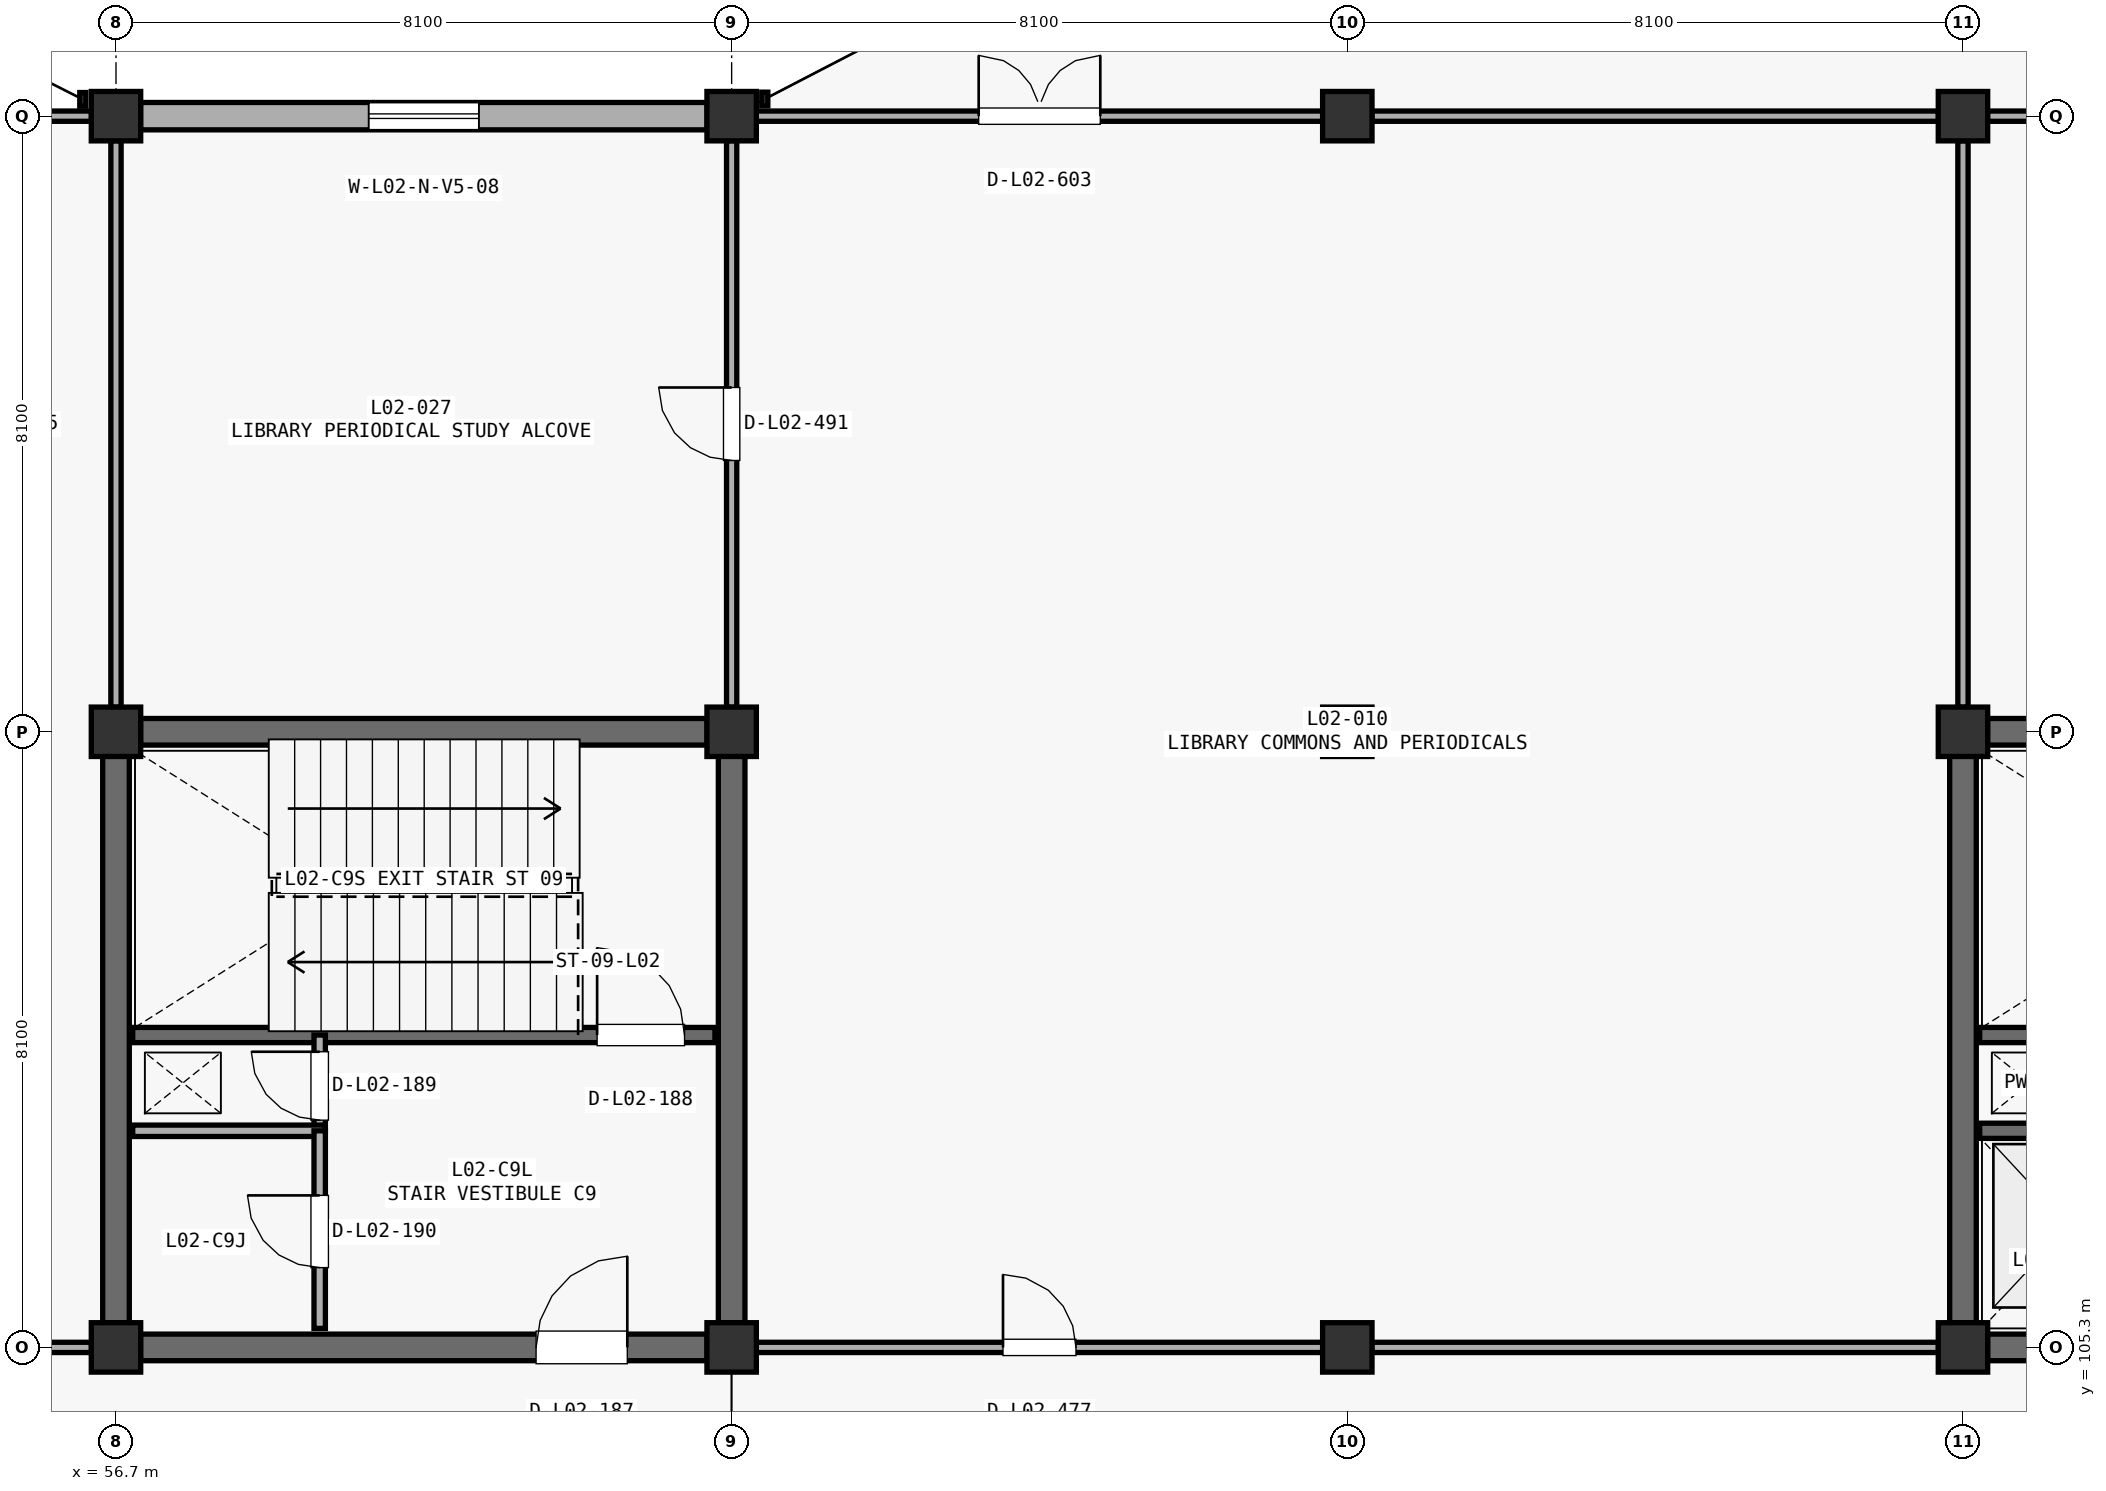
"""IFC4 building model, lengths in metres.
Left out: names, types, materials, properties, quantities, classifications, styles, units other than length and angle.
Written with IfcOpenShell. Run it as: python <this file> out.ifc"""

import sys

from ifc_helpers import new_model, si_unit, direction, frame, frame_2d, origin, origin_2d, place, context, subcontext, project, spatial, rectangle, extrude, element, fill, save


model = new_model("IFC4")
c1 = context("Model", 3, precision=1e-05, world=origin(), true_north=direction((0.0, 1.0)))
c2 = subcontext(c1, "Body", "Model", "MODEL_VIEW")
j1 = project(units=[si_unit("LENGTHUNIT", "METRE"), si_unit("PLANEANGLEUNIT", "RADIAN")], contexts=[c1])
p1 = place(None, origin())
s1 = spatial("IfcSite", under=j1, at=p1, CompositionType="ELEMENT")
p2 = place(p1, origin())
s2 = spatial("IfcBuilding", under=s1, at=p2, CompositionType="ELEMENT")
p3 = place(p2, frame((0.0, 0.0, 9.69)))
s3 = spatial("IfcBuildingStorey", under=s2, at=p3, CompositionType="ELEMENT", Elevation=9.69)
for number, where, z_axis, x_axis in (
    (1, (56.7, 105.3, 0.0), (0.0, 0.0, 1.0), (1.0, 0.0, 0.0)),
    (2, (56.7, 113.4, 0.0), (0.0, 0.0, 1.0), (1.0, 0.0, 0.0)),
    (3, (56.7, 121.5, 0.0), (0.0, 0.0, 1.0), (1.0, 0.0, 0.0)),
    (4, (64.8, 105.3, 0.0), (0.0, 0.0, 1.0), (1.0, 0.0, 0.0)),
    (5, (64.8, 113.4, 0.0), (0.0, 0.0, 1.0), (1.0, 0.0, 0.0)),
    (6, (64.8, 121.5, 0.0), (0.0, 0.0, 1.0), (1.0, 0.0, 0.0)),
    (7, (72.9, 105.3, 0.0), (0.0, 0.0, 1.0), (1.0, 0.0, 0.0)),
    (8, (72.9, 113.4, 0.0), (0.0, 0.0, 1.0), (1.0, 0.0, 0.0)),
    (9, (72.9, 121.5, 0.0), (0.0, 0.0, 1.0), (1.0, 0.0, 0.0)),
    (10, (81.0, 105.3, 0.0), (0.0, 0.0, 1.0), (1.0, 0.0, 0.0)),
    (11, (81.0, 113.4, 0.0), (0.0, 0.0, 1.0), (1.0, 0.0, 0.0)),
    (12, (81.0, 121.5, 0.0), (0.0, 0.0, 1.0), (1.0, 0.0, 0.0)),
):
    element("IfcColumn", number, at=place(p3, frame(where, z_axis=z_axis, x_axis=x_axis)), inside=s3, PredefinedType="COLUMN", context=c2, shape_type="SweptSolid", body=[
        extrude(rectangle(XDim=0.65, YDim=0.65, at=origin_2d()), origin(), (0.0, 0.0, 1.0), 4.42),
    ])
p4 = place(p3, frame((57.023, 121.5, 0.0), z_axis=(0.0, 0.0, 1.0), x_axis=(1.0, 0.0, 0.0)))
e13 = element("IfcWall", 13, at=p4, inside=s3, PredefinedType="STANDARD", context=c2, shape_type="SweptSolid", body=[
    extrude(rectangle(XDim=7.454, YDim=0.36, at=frame_2d((3.727, 0.0))), origin(), (0.0, 0.0, 1.0), 3.332),
])
p5 = place(p4, frame((3.002, 0.0, 0.85)))
e14 = element("IfcOpeningElement", 14, at=p5, cuts=e13, PredefinedType="OPENING", context=c2, shape_type="SweptSolid", body=[
    extrude(rectangle(XDim=1.45, YDim=1.7, at=frame_2d((0.725, 0.85))), frame((0.0, 0.19, 0.0), z_axis=(0.0, -1.0, 0.0), x_axis=(1.0, 0.0, 0.0)), (0.0, 0.0, 1.0), 0.38),
])
p6 = place(p3, frame((81.323, 113.4, 0.0), z_axis=(0.0, 0.0, 1.0), x_axis=(1.0, 0.0, 0.0)))
e15 = element("IfcWall", 15, at=p6, inside=s3, PredefinedType="SHEAR", context=c2, shape_type="SweptSolid", body=[
    extrude(rectangle(XDim=7.454, YDim=0.35, at=frame_2d((3.727, 0.0))), origin(), (0.0, 0.0, 1.0), 4.142),
])
p7 = place(p3, frame((81.0, 105.623, 0.0), z_axis=(0.0, 0.0, 1.0), x_axis=(0.0, 1.0, 0.0)))
e16 = element("IfcWall", 16, at=p7, inside=s3, PredefinedType="SHEAR", context=c2, shape_type="SweptSolid", body=[
    extrude(rectangle(XDim=7.454, YDim=0.35, at=frame_2d((3.727, 0.0))), origin(), (0.0, 0.0, 1.0), 4.142),
])
p8 = place(p3, frame((81.323, 105.3, 0.0), z_axis=(0.0, 0.0, 1.0), x_axis=(1.0, 0.0, 0.0)))
e17 = element("IfcWall", 17, at=p8, inside=s3, PredefinedType="SHEAR", context=c2, shape_type="SweptSolid", body=[
    extrude(rectangle(XDim=7.454, YDim=0.35, at=frame_2d((3.727, 0.0))), origin(), (0.0, 0.0, 1.0), 4.142),
])
p9 = place(p8, frame((5.204, 0.0, 0.0)))
e18 = element("IfcOpeningElement", 18, at=p9, cuts=e17, PredefinedType="OPENING", context=c2, shape_type="SweptSolid", body=[
    extrude(rectangle(XDim=1.2, YDim=2.2, at=frame_2d((0.6, 1.1))), frame((0.0, 0.185, 0.0), z_axis=(0.0, -1.0, 0.0), x_axis=(1.0, 0.0, 0.0)), (0.0, 0.0, 1.0), 0.37),
])
p10 = place(p3, frame((81.22, 109.41, 0.0), z_axis=(0.0, 0.0, 1.0), x_axis=(1.0, 0.0, 0.0)))
e19 = element("IfcWall", 19, at=p10, inside=s3, PredefinedType="SHEAR", context=c2, shape_type="SweptSolid", body=[
    extrude(rectangle(XDim=7.66, YDim=0.2, at=frame_2d((3.83, 0.0))), origin(), (0.0, 0.0, 1.0), 4.142),
])
p11 = place(p10, frame((6.11, 0.0, 0.0)))
e20 = element("IfcOpeningElement", 20, at=p11, cuts=e19, PredefinedType="OPENING", context=c2, shape_type="SweptSolid", body=[
    extrude(rectangle(XDim=1.15, YDim=2.2, at=frame_2d((0.575, 1.1))), frame((0.0, 0.11, 0.0), z_axis=(0.0, -1.0, 0.0), x_axis=(1.0, 0.0, 0.0)), (0.0, 0.0, 1.0), 0.22),
])
p12 = place(p3, frame((81.22, 108.15, 0.0), z_axis=(0.0, 0.0, 1.0), x_axis=(1.0, 0.0, 0.0)))
e21 = element("IfcWall", 21, at=p12, inside=s3, PredefinedType="SHEAR", context=c2, shape_type="SweptSolid", body=[
    extrude(rectangle(XDim=2.56, YDim=0.2, at=frame_2d((1.28, 0.0))), origin(), (0.0, 0.0, 1.0), 4.142),
])
p13 = place(p3, frame((57.023, 113.4, 0.0), z_axis=(0.0, 0.0, 1.0), x_axis=(1.0, 0.0, 0.0)))
e22 = element("IfcWall", 22, at=p13, inside=s3, PredefinedType="SHEAR", context=c2, shape_type="SweptSolid", body=[
    extrude(rectangle(XDim=7.454, YDim=0.35, at=frame_2d((3.727, 0.0))), origin(), (0.0, 0.0, 1.0), 4.082),
])
for number, where, z_axis, x_axis in (
    (23, (56.7, 105.623, 0.0), (0.0, 0.0, 1.0), (0.0, 1.0, 0.0)),
    (24, (64.8, 105.623, 0.0), (0.0, 0.0, 1.0), (0.0, 1.0, 0.0)),
):
    element("IfcWall", number, at=place(p3, frame(where, z_axis=z_axis, x_axis=x_axis)), inside=s3, PredefinedType="SHEAR", context=c2, shape_type="SweptSolid", body=[
        extrude(rectangle(XDim=7.454, YDim=0.35, at=frame_2d((3.727, 0.0))), origin(), (0.0, 0.0, 1.0), 4.082),
    ])
p14 = place(p3, frame((57.023, 105.3, 0.0), z_axis=(0.0, 0.0, 1.0), x_axis=(1.0, 0.0, 0.0)))
e25 = element("IfcWall", 25, at=p14, inside=s3, PredefinedType="SHEAR", context=c2, shape_type="SweptSolid", body=[
    extrude(rectangle(XDim=7.454, YDim=0.35, at=frame_2d((3.727, 0.0))), origin(), (0.0, 0.0, 1.0), 4.082),
])
p15 = place(p14, frame((5.204, 0.0, 0.0)))
e26 = element("IfcOpeningElement", 26, at=p15, cuts=e25, PredefinedType="OPENING", context=c2, shape_type="SweptSolid", body=[
    extrude(rectangle(XDim=1.2, YDim=2.2, at=frame_2d((0.6, 1.1))), frame((0.0, 0.185, 0.0), z_axis=(0.0, -1.0, 0.0), x_axis=(1.0, 0.0, 0.0)), (0.0, 0.0, 1.0), 0.37),
])
p16 = place(p3, frame((56.92, 109.41, 0.0), z_axis=(0.0, 0.0, 1.0), x_axis=(1.0, 0.0, 0.0)))
e27 = element("IfcWall", 27, at=p16, inside=s3, PredefinedType="SHEAR", context=c2, shape_type="SweptSolid", body=[
    extrude(rectangle(XDim=7.66, YDim=0.2, at=frame_2d((3.83, 0.0))), origin(), (0.0, 0.0, 1.0), 4.082),
])
p17 = place(p16, frame((6.11, 0.0, 0.0)))
e28 = element("IfcOpeningElement", 28, at=p17, cuts=e27, PredefinedType="OPENING", context=c2, shape_type="SweptSolid", body=[
    extrude(rectangle(XDim=1.15, YDim=2.2, at=frame_2d((0.575, 1.1))), frame((0.0, 0.11, 0.0), z_axis=(0.0, -1.0, 0.0), x_axis=(1.0, 0.0, 0.0)), (0.0, 0.0, 1.0), 0.22),
])
p18 = place(p3, frame((59.38, 108.15, 0.0), z_axis=(0.0, 0.0, 1.0), x_axis=(0.0, 1.0, 0.0)))
e29 = element("IfcWall", 29, at=p18, inside=s3, PredefinedType="PARTITIONING", context=c2, shape_type="SweptSolid", body=[
    extrude(rectangle(XDim=1.26, YDim=0.15, at=frame_2d((0.63, 0.0))), origin(), (0.0, 0.0, 1.0), 4.082),
])
p19 = place(p18, frame((0.14, 0.0, 0.0)))
e30 = element("IfcOpeningElement", 30, at=p19, cuts=e29, PredefinedType="OPENING", context=c2, shape_type="SweptSolid", body=[
    extrude(rectangle(XDim=0.9, YDim=2.15, at=frame_2d((0.45, 1.075))), frame((0.0, 0.085, 0.0), z_axis=(0.0, -1.0, 0.0), x_axis=(1.0, 0.0, 0.0)), (0.0, 0.0, 1.0), 0.17),
])
p20 = place(p3, frame((56.92, 108.15, 0.0), z_axis=(0.0, 0.0, 1.0), x_axis=(1.0, 0.0, 0.0)))
e31 = element("IfcWall", 31, at=p20, inside=s3, PredefinedType="PARTITIONING", context=c2, shape_type="SweptSolid", body=[
    extrude(rectangle(XDim=2.53, YDim=0.15, at=frame_2d((1.265, 0.0))), origin(), (0.0, 0.0, 1.0), 4.082),
])
p21 = place(p3, frame((59.38, 105.55, 0.0), z_axis=(0.0, 0.0, 1.0), x_axis=(0.0, 1.0, 0.0)))
e32 = element("IfcWall", 32, at=p21, inside=s3, PredefinedType="PARTITIONING", context=c2, shape_type="SweptSolid", body=[
    extrude(rectangle(XDim=2.6, YDim=0.15, at=frame_2d((1.3, 0.0))), origin(), (0.0, 0.0, 1.0), 4.082),
])
p22 = place(p21, frame((0.8, 0.0, 0.0)))
e33 = element("IfcOpeningElement", 33, at=p22, cuts=e32, PredefinedType="OPENING", context=c2, shape_type="SweptSolid", body=[
    extrude(rectangle(XDim=0.95, YDim=2.15, at=frame_2d((0.475, 1.075))), frame((0.0, 0.085, 0.0), z_axis=(0.0, -1.0, 0.0), x_axis=(1.0, 0.0, 0.0)), (0.0, 0.0, 1.0), 0.17),
])
p23 = place(p3, frame((48.923, 105.3, 0.0), z_axis=(0.0, 0.0, 1.0), x_axis=(1.0, 0.0, 0.0)))
e34 = element("IfcWall", 34, at=p23, inside=s3, PredefinedType="PARTITIONING", context=c2, shape_type="SweptSolid", body=[
    extrude(rectangle(XDim=7.454, YDim=0.135, at=frame_2d((3.727, 0.0))), origin(), (0.0, 0.0, 1.0), 3.482),
])
p24 = place(p23, frame((3.247, 0.0, 0.0)))
e35 = element("IfcOpeningElement", 35, at=p24, cuts=e34, PredefinedType="OPENING", context=c2, shape_type="SweptSolid", body=[
    extrude(rectangle(XDim=0.96, YDim=2.15, at=frame_2d((0.48, 1.075))), frame((0.0, 0.078, 0.0), z_axis=(0.0, -1.0, 0.0), x_axis=(1.0, 0.0, 0.0)), (0.0, 0.0, 1.0), 0.155),
])
p25 = place(p3, frame((56.7, 113.723, 0.0), z_axis=(0.0, 0.0, 1.0), x_axis=(0.0, 1.0, 0.0)))
e36 = element("IfcWall", 36, at=p25, inside=s3, PredefinedType="PARTITIONING", context=c2, shape_type="SweptSolid", body=[
    extrude(rectangle(XDim=7.454, YDim=0.135, at=frame_2d((3.727, 0.0))), origin(), (0.0, 0.0, 1.0), 3.432),
])
p26 = place(p3, frame((48.923, 121.5, 0.0), z_axis=(0.0, 0.0, 1.0), x_axis=(1.0, 0.0, 0.0)))
e37 = element("IfcWall", 37, at=p26, inside=s3, PredefinedType="PARTITIONING", context=c2, shape_type="SweptSolid", body=[
    extrude(rectangle(XDim=7.454, YDim=0.135, at=frame_2d((3.727, 0.0))), origin(), (0.0, 0.0, 1.0), 3.667),
])
p27 = place(p3, frame((65.123, 105.3, 0.0), z_axis=(0.0, 0.0, 1.0), x_axis=(1.0, 0.0, 0.0)))
e38 = element("IfcWall", 38, at=p27, inside=s3, PredefinedType="PARTITIONING", context=c2, shape_type="SweptSolid", body=[
    extrude(rectangle(XDim=7.454, YDim=0.135, at=frame_2d((3.727, 0.0))), origin(), (0.0, 0.0, 1.0), 3.192),
])
p28 = place(p27, frame((3.247, 0.0, 0.0)))
e39 = element("IfcOpeningElement", 39, at=p28, cuts=e38, PredefinedType="OPENING", context=c2, shape_type="SweptSolid", body=[
    extrude(rectangle(XDim=0.96, YDim=2.15, at=frame_2d((0.48, 1.075))), frame((0.0, 0.078, 0.0), z_axis=(0.0, -1.0, 0.0), x_axis=(1.0, 0.0, 0.0)), (0.0, 0.0, 1.0), 0.155),
])
p29 = place(p3, frame((73.223, 105.3, 0.0), z_axis=(0.0, 0.0, 1.0), x_axis=(1.0, 0.0, 0.0)))
e40 = element("IfcWall", 40, at=p29, inside=s3, PredefinedType="PARTITIONING", context=c2, shape_type="SweptSolid", body=[
    extrude(rectangle(XDim=7.454, YDim=0.135, at=frame_2d((3.727, 0.0))), origin(), (0.0, 0.0, 1.0), 3.392),
])
p30 = place(p3, frame((81.0, 113.723, 0.0), z_axis=(0.0, 0.0, 1.0), x_axis=(0.0, 1.0, 0.0)))
e41 = element("IfcWall", 41, at=p30, inside=s3, PredefinedType="PARTITIONING", context=c2, shape_type="SweptSolid", body=[
    extrude(rectangle(XDim=7.454, YDim=0.135, at=frame_2d((3.727, 0.0))), origin(), (0.0, 0.0, 1.0), 3.542),
])
p31 = place(p3, frame((64.8, 113.723, 0.0), z_axis=(0.0, 0.0, 1.0), x_axis=(0.0, 1.0, 0.0)))
e42 = element("IfcWall", 42, at=p31, inside=s3, PredefinedType="PARTITIONING", context=c2, shape_type="SweptSolid", body=[
    extrude(rectangle(XDim=7.454, YDim=0.135, at=frame_2d((3.727, 0.0))), origin(), (0.0, 0.0, 1.0), 3.232),
])
p32 = place(p31, frame((3.247, 0.0, 0.0)))
e43 = element("IfcOpeningElement", 43, at=p32, cuts=e42, PredefinedType="OPENING", context=c2, shape_type="SweptSolid", body=[
    extrude(rectangle(XDim=0.96, YDim=2.15, at=frame_2d((0.48, 1.075))), frame((0.0, 0.078, 0.0), z_axis=(0.0, -1.0, 0.0), x_axis=(1.0, 0.0, 0.0)), (0.0, 0.0, 1.0), 0.155),
])
p33 = place(p3, frame((65.123, 121.5, 0.0), z_axis=(0.0, 0.0, 1.0), x_axis=(1.0, 0.0, 0.0)))
e44 = element("IfcWall", 44, at=p33, inside=s3, PredefinedType="PARTITIONING", context=c2, shape_type="SweptSolid", body=[
    extrude(rectangle(XDim=7.454, YDim=0.135, at=frame_2d((3.727, 0.0))), origin(), (0.0, 0.0, 1.0), 3.492),
])
p34 = place(p33, frame((2.927, 0.0, 0.0)))
e45 = element("IfcOpeningElement", 45, at=p34, cuts=e44, PredefinedType="OPENING", context=c2, shape_type="SweptSolid", body=[
    extrude(rectangle(XDim=1.6, YDim=2.2, at=frame_2d((0.8, 1.1))), frame((0.0, 0.078, 0.0), z_axis=(0.0, -1.0, 0.0), x_axis=(1.0, 0.0, 0.0)), (0.0, 0.0, 1.0), 0.155),
])
p35 = place(p3, frame((73.223, 121.5, 0.0), z_axis=(0.0, 0.0, 1.0), x_axis=(1.0, 0.0, 0.0)))
e46 = element("IfcWall", 46, at=p35, inside=s3, PredefinedType="PARTITIONING", context=c2, shape_type="SweptSolid", body=[
    extrude(rectangle(XDim=7.454, YDim=0.135, at=frame_2d((3.727, 0.0))), origin(), (0.0, 0.0, 1.0), 3.727),
])
p36 = place(p3, frame((81.323, 121.5, 0.0), z_axis=(0.0, 0.0, 1.0), x_axis=(1.0, 0.0, 0.0)))
e47 = element("IfcWall", 47, at=p36, inside=s3, PredefinedType="PARTITIONING", context=c2, shape_type="SweptSolid", body=[
    extrude(rectangle(XDim=7.454, YDim=0.135, at=frame_2d((3.727, 0.0))), origin(), (0.0, 0.0, 1.0), 3.292),
])
p37 = place(p36, frame((3.247, 0.0, 0.0)))
e48 = element("IfcOpeningElement", 48, at=p37, cuts=e47, PredefinedType="OPENING", context=c2, shape_type="SweptSolid", body=[
    extrude(rectangle(XDim=0.96, YDim=2.15, at=frame_2d((0.48, 1.075))), frame((0.0, 0.078, 0.0), z_axis=(0.0, -1.0, 0.0), x_axis=(1.0, 0.0, 0.0)), (0.0, 0.0, 1.0), 0.155),
])
p38 = place(p5, origin())
e49 = element("IfcWindow", 49, at=p38, inside=s3, PartitioningType="SINGLE_PANEL", PredefinedType="WINDOW", context=c2, shape_type="SweptSolid", body=[
    extrude(rectangle(XDim=1.45, YDim=1.7, at=frame_2d((0.725, 0.85))), frame((0.0, 0.03, 0.0), z_axis=(0.0, -1.0, 0.0), x_axis=(1.0, 0.0, 0.0)), (0.0, 0.0, 1.0), 0.06),
])
fill(e14, e49)
p39 = place(p15, origin())
e50 = element("IfcDoor", 50, at=p39, inside=s3, OperationType="SINGLE_SWING_RIGHT", PredefinedType="DOOR", context=c2, shape_type="SweptSolid", body=[
    extrude(rectangle(XDim=1.2, YDim=2.2, at=frame_2d((0.6, 1.1))), frame((0.0, 0.025, 0.0), z_axis=(0.0, -1.0, 0.0), x_axis=(1.0, 0.0, 0.0)), (0.0, 0.0, 1.0), 0.05),
])
fill(e26, e50)
p40 = place(p17, origin())
e51 = element("IfcDoor", 51, at=p40, inside=s3, OperationType="SINGLE_SWING_LEFT", PredefinedType="DOOR", context=c2, shape_type="SweptSolid", body=[
    extrude(rectangle(XDim=1.15, YDim=2.2, at=frame_2d((0.575, 1.1))), frame((0.0, 0.025, 0.0), z_axis=(0.0, -1.0, 0.0), x_axis=(1.0, 0.0, 0.0)), (0.0, 0.0, 1.0), 0.05),
])
fill(e28, e51)
p41 = place(p19, origin())
e52 = element("IfcDoor", 52, at=p41, inside=s3, OperationType="SINGLE_SWING_RIGHT", PredefinedType="DOOR", context=c2, shape_type="SweptSolid", body=[
    extrude(rectangle(XDim=0.9, YDim=2.15, at=frame_2d((0.45, 1.075))), frame((0.0, 0.025, 0.0), z_axis=(0.0, -1.0, 0.0), x_axis=(1.0, 0.0, 0.0)), (0.0, 0.0, 1.0), 0.05),
])
fill(e30, e52)
p42 = place(p22, origin())
e53 = element("IfcDoor", 53, at=p42, inside=s3, OperationType="SINGLE_SWING_RIGHT", PredefinedType="DOOR", context=c2, shape_type="SweptSolid", body=[
    extrude(rectangle(XDim=0.95, YDim=2.15, at=frame_2d((0.475, 1.075))), frame((0.0, 0.025, 0.0), z_axis=(0.0, -1.0, 0.0), x_axis=(1.0, 0.0, 0.0)), (0.0, 0.0, 1.0), 0.05),
])
fill(e33, e53)
p43 = place(p28, origin())
e54 = element("IfcDoor", 54, at=p43, inside=s3, OperationType="SINGLE_SWING_LEFT", PredefinedType="DOOR", context=c2, shape_type="SweptSolid", body=[
    extrude(rectangle(XDim=0.96, YDim=2.15, at=frame_2d((0.48, 1.075))), frame((0.0, 0.025, 0.0), z_axis=(0.0, -1.0, 0.0), x_axis=(1.0, 0.0, 0.0)), (0.0, 0.0, 1.0), 0.05),
])
fill(e39, e54)
p44 = place(p32, origin())
e55 = element("IfcDoor", 55, at=p44, inside=s3, OperationType="SINGLE_SWING_RIGHT", PredefinedType="DOOR", context=c2, shape_type="SweptSolid", body=[
    extrude(rectangle(XDim=0.96, YDim=2.15, at=frame_2d((0.48, 1.075))), frame((0.0, 0.025, 0.0), z_axis=(0.0, -1.0, 0.0), x_axis=(1.0, 0.0, 0.0)), (0.0, 0.0, 1.0), 0.05),
])
fill(e43, e55)
p45 = place(p34, origin())
e56 = element("IfcDoor", 56, at=p45, inside=s3, OperationType="DOUBLE_SWING_LEFT", PredefinedType="DOOR", context=c2, shape_type="SweptSolid", body=[
    extrude(rectangle(XDim=1.6, YDim=2.2, at=frame_2d((0.8, 1.1))), frame((0.0, 0.025, 0.0), z_axis=(0.0, -1.0, 0.0), x_axis=(1.0, 0.0, 0.0)), (0.0, 0.0, 1.0), 0.05),
])
fill(e45, e56)
save(model, sys.argv[1])
